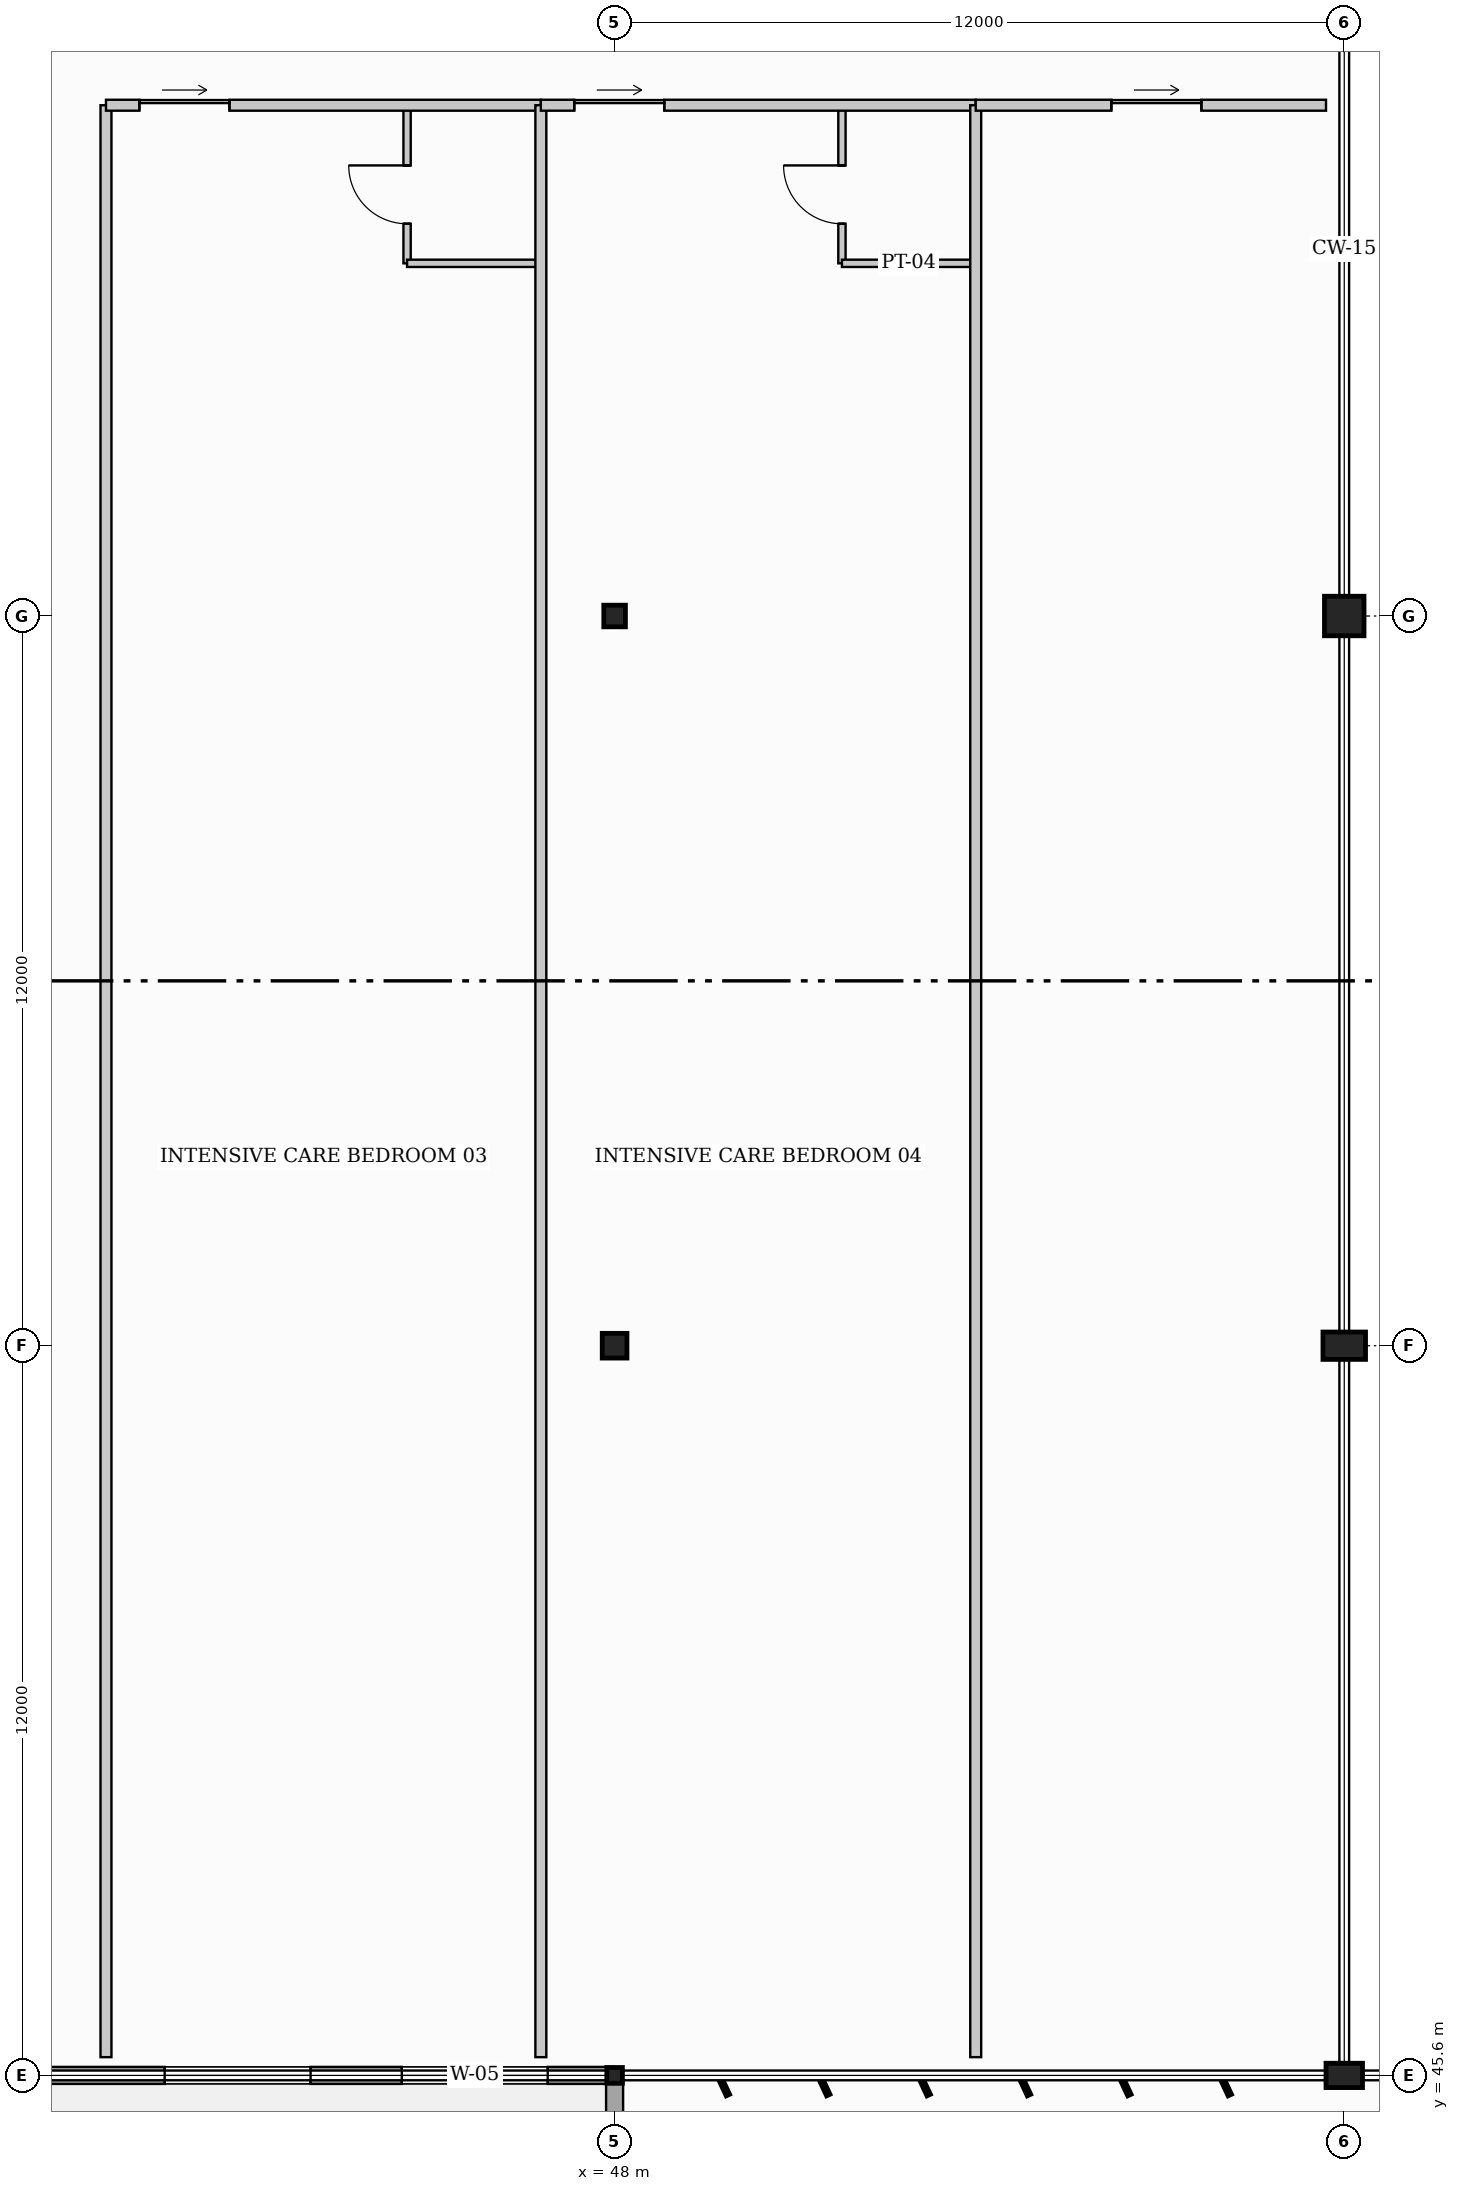
"""IFC4 building model, lengths in metres.
Left out: names, types, materials, properties, quantities, classifications, styles, units other than length and angle.
Written with IfcOpenShell. Run it as: python <this file> out.ifc"""

import sys

from ifc_helpers import new_model, si_unit, direction, frame, frame_2d, origin, origin_2d, place, context, subcontext, project, spatial, rectangle, hollow_circle, i_section, extrude, element, fill, save


model = new_model("IFC4")
c1 = context("Model", 3, precision=1e-05, world=origin(), true_north=direction((0.0, 1.0)))
c2 = subcontext(c1, "Body", "Model", "MODEL_VIEW")
j1 = project(units=[si_unit("LENGTHUNIT", "METRE"), si_unit("PLANEANGLEUNIT", "RADIAN")], contexts=[c1])
p1 = place(None, origin())
s1 = spatial("IfcSite", under=j1, at=p1, CompositionType="ELEMENT")
p2 = place(p1, origin())
s2 = spatial("IfcBuilding", under=s1, at=p2, CompositionType="ELEMENT")
p3 = place(p2, frame((0.0, 0.0, 4.8)))
s3 = spatial("IfcBuildingStorey", under=s2, at=p3, CompositionType="ELEMENT", Elevation=4.8)
p4 = place(p3, frame((48.0, 45.6, 0.0), z_axis=(0.0, 0.0, 1.0), x_axis=(1.0, 0.0, 0.0)))
e1 = element("IfcColumn", 1, at=p4, inside=s3, PredefinedType="COLUMN", context=c2, shape_type="SweptSolid", body=[
    extrude(i_section(OverallWidth=0.256, OverallDepth=0.26, WebThickness=0.01, FlangeThickness=0.017, at=origin_2d()), origin(), (0.0, 0.0, 1.0), 4.8),
])
p5 = place(p3, frame((48.0, 57.6, 0.0), z_axis=(0.0, 0.0, 1.0), x_axis=(1.0, 0.0, 0.0)))
e2 = element("IfcColumn", 2, at=p5, inside=s3, PredefinedType="COLUMN", context=c2, shape_type="SweptSolid", body=[
    extrude(hollow_circle(Radius=0.203, WallThickness=0.016, at=origin_2d()), origin(), (0.0, 0.0, 1.0), 4.8),
])
p6 = place(p3, frame((48.0, 69.6, 0.0), z_axis=(0.0, 0.0, 1.0), x_axis=(1.0, 0.0, 0.0)))
e3 = element("IfcColumn", 3, at=p6, inside=s3, PredefinedType="COLUMN", context=c2, shape_type="SweptSolid", body=[
    extrude(hollow_circle(Radius=0.178, WallThickness=0.013, at=origin_2d()), origin(), (0.0, 0.0, 1.0), 4.8),
])
p7 = place(p3, frame((60.0, 45.6, 0.0), z_axis=(0.0, 0.0, 1.0), x_axis=(0.0, 1.0, 0.0)))
e4 = element("IfcColumn", 4, at=p7, inside=s3, PredefinedType="PILASTER", context=c2, shape_type="SweptSolid", body=[
    extrude(rectangle(XDim=0.4, YDim=0.6, at=origin_2d()), origin(), (0.0, 0.0, 1.0), 4.8),
])
p8 = place(p3, frame((60.0, 57.6, 0.0), z_axis=(0.0, 0.0, 1.0), x_axis=(0.0, 1.0, 0.0)))
e5 = element("IfcColumn", 5, at=p8, inside=s3, PredefinedType="PILASTER", context=c2, shape_type="SweptSolid", body=[
    extrude(rectangle(XDim=0.45, YDim=0.7, at=origin_2d()), origin(), (0.0, 0.0, 1.0), 4.8),
])
p9 = place(p3, frame((60.0, 69.6, 0.0), z_axis=(0.0, 0.0, 1.0), x_axis=(0.0, 1.0, 0.0)))
e6 = element("IfcColumn", 6, at=p9, inside=s3, PredefinedType="COLUMN", context=c2, shape_type="SweptSolid", body=[
    extrude(rectangle(XDim=0.65, YDim=0.65, at=origin_2d()), origin(), (0.0, 0.0, 1.0), 4.8),
])
p10 = place(p3, frame((48.0, 45.6, 0.0), z_axis=(0.0, 0.0, 1.0), x_axis=(-1.0, 0.0, 0.0)))
e7 = element("IfcWall", 7, at=p10, inside=s3, PredefinedType="STANDARD", context=c2, shape_type="SweptSolid", body=[
    extrude(rectangle(XDim=48.0, YDim=0.28, at=frame_2d((24.0, 0.0))), origin(), (0.0, 0.0, 1.0), 3.465),
])
p11 = place(p10, frame((1.1, 0.0, 0.95)))
e8 = element("IfcOpeningElement", 8, at=p11, cuts=e7, PredefinedType="OPENING", context=c2, shape_type="SweptSolid", body=[
    extrude(rectangle(XDim=2.4, YDim=1.5, at=frame_2d((1.2, 0.75))), frame((0.0, 0.15, 0.0), z_axis=(0.0, -1.0, 0.0), x_axis=(1.0, 0.0, 0.0)), (0.0, 0.0, 1.0), 0.3),
])
p12 = place(p10, frame((5.0, 0.0, 0.95)))
e9 = element("IfcOpeningElement", 9, at=p12, cuts=e7, PredefinedType="OPENING", context=c2, shape_type="SweptSolid", body=[
    extrude(rectangle(XDim=2.4, YDim=1.5, at=frame_2d((1.2, 0.75))), frame((0.0, 0.15, 0.0), z_axis=(0.0, -1.0, 0.0), x_axis=(1.0, 0.0, 0.0)), (0.0, 0.0, 1.0), 0.3),
])
p13 = place(p10, frame((16.7, 0.0, 0.95)))
e10 = element("IfcOpeningElement", 10, at=p13, cuts=e7, PredefinedType="OPENING", context=c2, shape_type="SweptSolid", body=[
    extrude(rectangle(XDim=2.4, YDim=1.5, at=frame_2d((1.2, 0.75))), frame((0.0, 0.15, 0.0), z_axis=(0.0, -1.0, 0.0), x_axis=(1.0, 0.0, 0.0)), (0.0, 0.0, 1.0), 0.3),
])
p14 = place(p10, frame((20.6, 0.0, 0.95)))
e11 = element("IfcOpeningElement", 11, at=p14, cuts=e7, PredefinedType="OPENING", context=c2, shape_type="SweptSolid", body=[
    extrude(rectangle(XDim=2.4, YDim=1.5, at=frame_2d((1.2, 0.75))), frame((0.0, 0.15, 0.0), z_axis=(0.0, -1.0, 0.0), x_axis=(1.0, 0.0, 0.0)), (0.0, 0.0, 1.0), 0.3),
])
p15 = place(p10, frame((28.4, 0.0, 0.95)))
e12 = element("IfcOpeningElement", 12, at=p15, cuts=e7, PredefinedType="OPENING", context=c2, shape_type="SweptSolid", body=[
    extrude(rectangle(XDim=2.4, YDim=1.5, at=frame_2d((1.2, 0.75))), frame((0.0, 0.15, 0.0), z_axis=(0.0, -1.0, 0.0), x_axis=(1.0, 0.0, 0.0)), (0.0, 0.0, 1.0), 0.3),
])
p16 = place(p10, frame((32.3, 0.0, 0.95)))
e13 = element("IfcOpeningElement", 13, at=p16, cuts=e7, PredefinedType="OPENING", context=c2, shape_type="SweptSolid", body=[
    extrude(rectangle(XDim=2.4, YDim=1.5, at=frame_2d((1.2, 0.75))), frame((0.0, 0.15, 0.0), z_axis=(0.0, -1.0, 0.0), x_axis=(1.0, 0.0, 0.0)), (0.0, 0.0, 1.0), 0.3),
])
p17 = place(p10, frame((40.1, 0.0, 0.95)))
e14 = element("IfcOpeningElement", 14, at=p17, cuts=e7, PredefinedType="OPENING", context=c2, shape_type="SweptSolid", body=[
    extrude(rectangle(XDim=2.4, YDim=1.5, at=frame_2d((1.2, 0.75))), frame((0.0, 0.15, 0.0), z_axis=(0.0, -1.0, 0.0), x_axis=(1.0, 0.0, 0.0)), (0.0, 0.0, 1.0), 0.3),
])
p18 = place(p10, frame((44.0, 0.0, 0.95)))
e15 = element("IfcOpeningElement", 15, at=p18, cuts=e7, PredefinedType="OPENING", context=c2, shape_type="SweptSolid", body=[
    extrude(rectangle(XDim=2.4, YDim=1.5, at=frame_2d((1.2, 0.75))), frame((0.0, 0.15, 0.0), z_axis=(0.0, -1.0, 0.0), x_axis=(1.0, 0.0, 0.0)), (0.0, 0.0, 1.0), 0.3),
])
p19 = place(p3, frame((48.0, 0.0, 0.0), z_axis=(0.0, 0.0, 1.0), x_axis=(0.0, 1.0, 0.0)))
e16 = element("IfcWall", 16, at=p19, inside=s3, PredefinedType="STANDARD", context=c2, shape_type="SweptSolid", body=[
    extrude(rectangle(XDim=45.6, YDim=0.28, at=frame_2d((22.8, 0.0))), origin(), (0.0, 0.0, 1.0), 3.515),
])
p20 = place(p3, frame((39.635, 45.9, 0.0), z_axis=(0.0, 0.0, 1.0), x_axis=(0.0, 1.0, 0.0)))
e17 = element("IfcWall", 17, at=p20, inside=s3, PredefinedType="PARTITIONING", context=c2, shape_type="SweptSolid", body=[
    extrude(rectangle(XDim=32.1, YDim=0.18, at=frame_2d((16.05, 0.0))), origin(), (0.0, 0.0, 1.0), 3.958),
])
p21 = place(p3, frame((44.587, 75.4, 0.0), z_axis=(0.0, 0.0, 1.0), x_axis=(0.0, 1.0, 0.0)))
e18 = element("IfcWall", 18, at=p21, inside=s3, PredefinedType="PARTITIONING", context=c2, shape_type="SweptSolid", body=[
    extrude(rectangle(XDim=2.6, YDim=0.12, at=frame_2d((1.3, 0.0))), origin(), (0.0, 0.0, 1.0), 4.43),
])
p22 = place(p21, frame((0.65, 0.0, 0.0)))
e19 = element("IfcOpeningElement", 19, at=p22, cuts=e18, PredefinedType="OPENING", context=c2, shape_type="SweptSolid", body=[
    extrude(rectangle(XDim=0.96, YDim=2.06, at=frame_2d((0.48, 1.03))), frame((0.0, 0.07, 0.0), z_axis=(0.0, -1.0, 0.0), x_axis=(1.0, 0.0, 0.0)), (0.0, 0.0, 1.0), 0.14),
])
p23 = place(p3, frame((44.587, 75.4, 0.0), z_axis=(0.0, 0.0, 1.0), x_axis=(1.0, 0.0, 0.0)))
e20 = element("IfcWall", 20, at=p23, inside=s3, PredefinedType="PARTITIONING", context=c2, shape_type="SweptSolid", body=[
    extrude(rectangle(XDim=2.2, YDim=0.12, at=frame_2d((1.1, 0.0))), origin(), (0.0, 0.0, 1.0), 4.43),
])
p24 = place(p3, frame((39.635, 78.0, 0.0), z_axis=(0.0, 0.0, 1.0), x_axis=(1.0, 0.0, 0.0)))
e21 = element("IfcWall", 21, at=p24, inside=s3, PredefinedType="PARTITIONING", context=c2, shape_type="SweptSolid", body=[
    extrude(rectangle(XDim=7.152, YDim=0.18, at=frame_2d((3.576, 0.0))), origin(), (0.0, 0.0, 1.0), 4.43),
])
p25 = place(p24, frame((0.55, 0.0, 0.0)))
e22 = element("IfcOpeningElement", 22, at=p25, cuts=e21, PredefinedType="OPENING", context=c2, shape_type="SweptSolid", body=[
    extrude(rectangle(XDim=1.48, YDim=2.26, at=frame_2d((0.74, 1.13))), frame((0.0, 0.1, 0.0), z_axis=(0.0, -1.0, 0.0), x_axis=(1.0, 0.0, 0.0)), (0.0, 0.0, 1.0), 0.2),
])
p26 = place(p3, frame((46.787, 45.9, 0.0), z_axis=(0.0, 0.0, 1.0), x_axis=(0.0, 1.0, 0.0)))
e23 = element("IfcWall", 23, at=p26, inside=s3, PredefinedType="PARTITIONING", context=c2, shape_type="SweptSolid", body=[
    extrude(rectangle(XDim=32.1, YDim=0.18, at=frame_2d((16.05, 0.0))), origin(), (0.0, 0.0, 1.0), 3.958),
])
p27 = place(p3, frame((51.739, 75.4, 0.0), z_axis=(0.0, 0.0, 1.0), x_axis=(0.0, 1.0, 0.0)))
e24 = element("IfcWall", 24, at=p27, inside=s3, PredefinedType="PARTITIONING", context=c2, shape_type="SweptSolid", body=[
    extrude(rectangle(XDim=2.6, YDim=0.12, at=frame_2d((1.3, 0.0))), origin(), (0.0, 0.0, 1.0), 4.009),
])
p28 = place(p27, frame((0.65, 0.0, 0.0)))
e25 = element("IfcOpeningElement", 25, at=p28, cuts=e24, PredefinedType="OPENING", context=c2, shape_type="SweptSolid", body=[
    extrude(rectangle(XDim=0.96, YDim=2.06, at=frame_2d((0.48, 1.03))), frame((0.0, 0.07, 0.0), z_axis=(0.0, -1.0, 0.0), x_axis=(1.0, 0.0, 0.0)), (0.0, 0.0, 1.0), 0.14),
])
p29 = place(p3, frame((51.739, 75.4, 0.0), z_axis=(0.0, 0.0, 1.0), x_axis=(1.0, 0.0, 0.0)))
e26 = element("IfcWall", 26, at=p29, inside=s3, PredefinedType="PARTITIONING", context=c2, shape_type="SweptSolid", body=[
    extrude(rectangle(XDim=2.2, YDim=0.12, at=frame_2d((1.1, 0.0))), origin(), (0.0, 0.0, 1.0), 4.43),
])
p30 = place(p3, frame((46.787, 78.0, 0.0), z_axis=(0.0, 0.0, 1.0), x_axis=(1.0, 0.0, 0.0)))
e27 = element("IfcWall", 27, at=p30, inside=s3, PredefinedType="PARTITIONING", context=c2, shape_type="SweptSolid", body=[
    extrude(rectangle(XDim=7.152, YDim=0.18, at=frame_2d((3.576, 0.0))), origin(), (0.0, 0.0, 1.0), 3.765),
])
p31 = place(p30, frame((0.55, 0.0, 0.0)))
e28 = element("IfcOpeningElement", 28, at=p31, cuts=e27, PredefinedType="OPENING", context=c2, shape_type="SweptSolid", body=[
    extrude(rectangle(XDim=1.48, YDim=2.26, at=frame_2d((0.74, 1.13))), frame((0.0, 0.1, 0.0), z_axis=(0.0, -1.0, 0.0), x_axis=(1.0, 0.0, 0.0)), (0.0, 0.0, 1.0), 0.2),
])
p32 = place(p3, frame((53.939, 45.9, 0.0), z_axis=(0.0, 0.0, 1.0), x_axis=(0.0, 1.0, 0.0)))
e29 = element("IfcWall", 29, at=p32, inside=s3, PredefinedType="PARTITIONING", context=c2, shape_type="SweptSolid", body=[
    extrude(rectangle(XDim=32.1, YDim=0.18, at=frame_2d((16.05, 0.0))), origin(), (0.0, 0.0, 1.0), 3.465),
])
p33 = place(p3, frame((53.939, 78.0, 0.0), z_axis=(0.0, 0.0, 1.0), x_axis=(1.0, 0.0, 0.0)))
e30 = element("IfcWall", 30, at=p33, inside=s3, PredefinedType="PARTITIONING", context=c2, shape_type="SweptSolid", body=[
    extrude(rectangle(XDim=5.761, YDim=0.18, at=frame_2d((2.88, 0.0))), origin(), (0.0, 0.0, 1.0), 3.53),
])
p34 = place(p33, frame((2.231, 0.0, 0.0)))
e31 = element("IfcOpeningElement", 31, at=p34, cuts=e30, PredefinedType="OPENING", context=c2, shape_type="SweptSolid", body=[
    extrude(rectangle(XDim=1.48, YDim=2.26, at=frame_2d((0.74, 1.13))), frame((0.0, 0.1, 0.0), z_axis=(0.0, -1.0, 0.0), x_axis=(1.0, 0.0, 0.0)), (0.0, 0.0, 1.0), 0.2),
])
p35 = place(p11, origin())
e32 = element("IfcWindow", 32, at=p35, inside=s3, PartitioningType="TRIPLE_PANEL_VERTICAL", PredefinedType="WINDOW", context=c2, shape_type="SweptSolid", body=[
    extrude(rectangle(XDim=2.4, YDim=1.5, at=frame_2d((1.2, 0.75))), frame((0.0, 0.03, 0.0), z_axis=(0.0, -1.0, 0.0), x_axis=(1.0, 0.0, 0.0)), (0.0, 0.0, 1.0), 0.06),
])
fill(e8, e32)
p36 = place(p12, origin())
e33 = element("IfcWindow", 33, at=p36, inside=s3, PartitioningType="TRIPLE_PANEL_VERTICAL", PredefinedType="WINDOW", context=c2, shape_type="SweptSolid", body=[
    extrude(rectangle(XDim=2.4, YDim=1.5, at=frame_2d((1.2, 0.75))), frame((0.0, 0.03, 0.0), z_axis=(0.0, -1.0, 0.0), x_axis=(1.0, 0.0, 0.0)), (0.0, 0.0, 1.0), 0.06),
])
fill(e9, e33)
p37 = place(p22, origin())
e34 = element("IfcDoor", 34, at=p37, inside=s3, OperationType="SINGLE_SWING_RIGHT", PredefinedType="DOOR", context=c2, shape_type="SweptSolid", body=[
    extrude(rectangle(XDim=0.96, YDim=2.06, at=frame_2d((0.48, 1.03))), frame((0.0, 0.025, 0.0), z_axis=(0.0, -1.0, 0.0), x_axis=(1.0, 0.0, 0.0)), (0.0, 0.0, 1.0), 0.05),
])
fill(e19, e34)
p38 = place(p25, origin())
e35 = element("IfcDoor", 35, at=p38, inside=s3, OperationType="SLIDING_TO_LEFT", PredefinedType="DOOR", context=c2, shape_type="SweptSolid", body=[
    extrude(rectangle(XDim=1.48, YDim=2.26, at=frame_2d((0.74, 1.13))), frame((0.0, 0.025, 0.0), z_axis=(0.0, -1.0, 0.0), x_axis=(1.0, 0.0, 0.0)), (0.0, 0.0, 1.0), 0.05),
])
fill(e22, e35)
p39 = place(p28, origin())
e36 = element("IfcDoor", 36, at=p39, inside=s3, OperationType="SINGLE_SWING_RIGHT", PredefinedType="DOOR", context=c2, shape_type="SweptSolid", body=[
    extrude(rectangle(XDim=0.96, YDim=2.06, at=frame_2d((0.48, 1.03))), frame((0.0, 0.025, 0.0), z_axis=(0.0, -1.0, 0.0), x_axis=(1.0, 0.0, 0.0)), (0.0, 0.0, 1.0), 0.05),
])
fill(e25, e36)
p40 = place(p31, origin())
e37 = element("IfcDoor", 37, at=p40, inside=s3, OperationType="SLIDING_TO_LEFT", PredefinedType="DOOR", context=c2, shape_type="SweptSolid", body=[
    extrude(rectangle(XDim=1.48, YDim=2.26, at=frame_2d((0.74, 1.13))), frame((0.0, 0.025, 0.0), z_axis=(0.0, -1.0, 0.0), x_axis=(1.0, 0.0, 0.0)), (0.0, 0.0, 1.0), 0.05),
])
fill(e28, e37)
p41 = place(p34, origin())
e38 = element("IfcDoor", 38, at=p41, inside=s3, OperationType="SLIDING_TO_LEFT", PredefinedType="DOOR", context=c2, shape_type="SweptSolid", body=[
    extrude(rectangle(XDim=1.48, YDim=2.26, at=frame_2d((0.74, 1.13))), frame((0.0, 0.025, 0.0), z_axis=(0.0, -1.0, 0.0), x_axis=(1.0, 0.0, 0.0)), (0.0, 0.0, 1.0), 0.05),
])
fill(e31, e38)
save(model, sys.argv[1])
